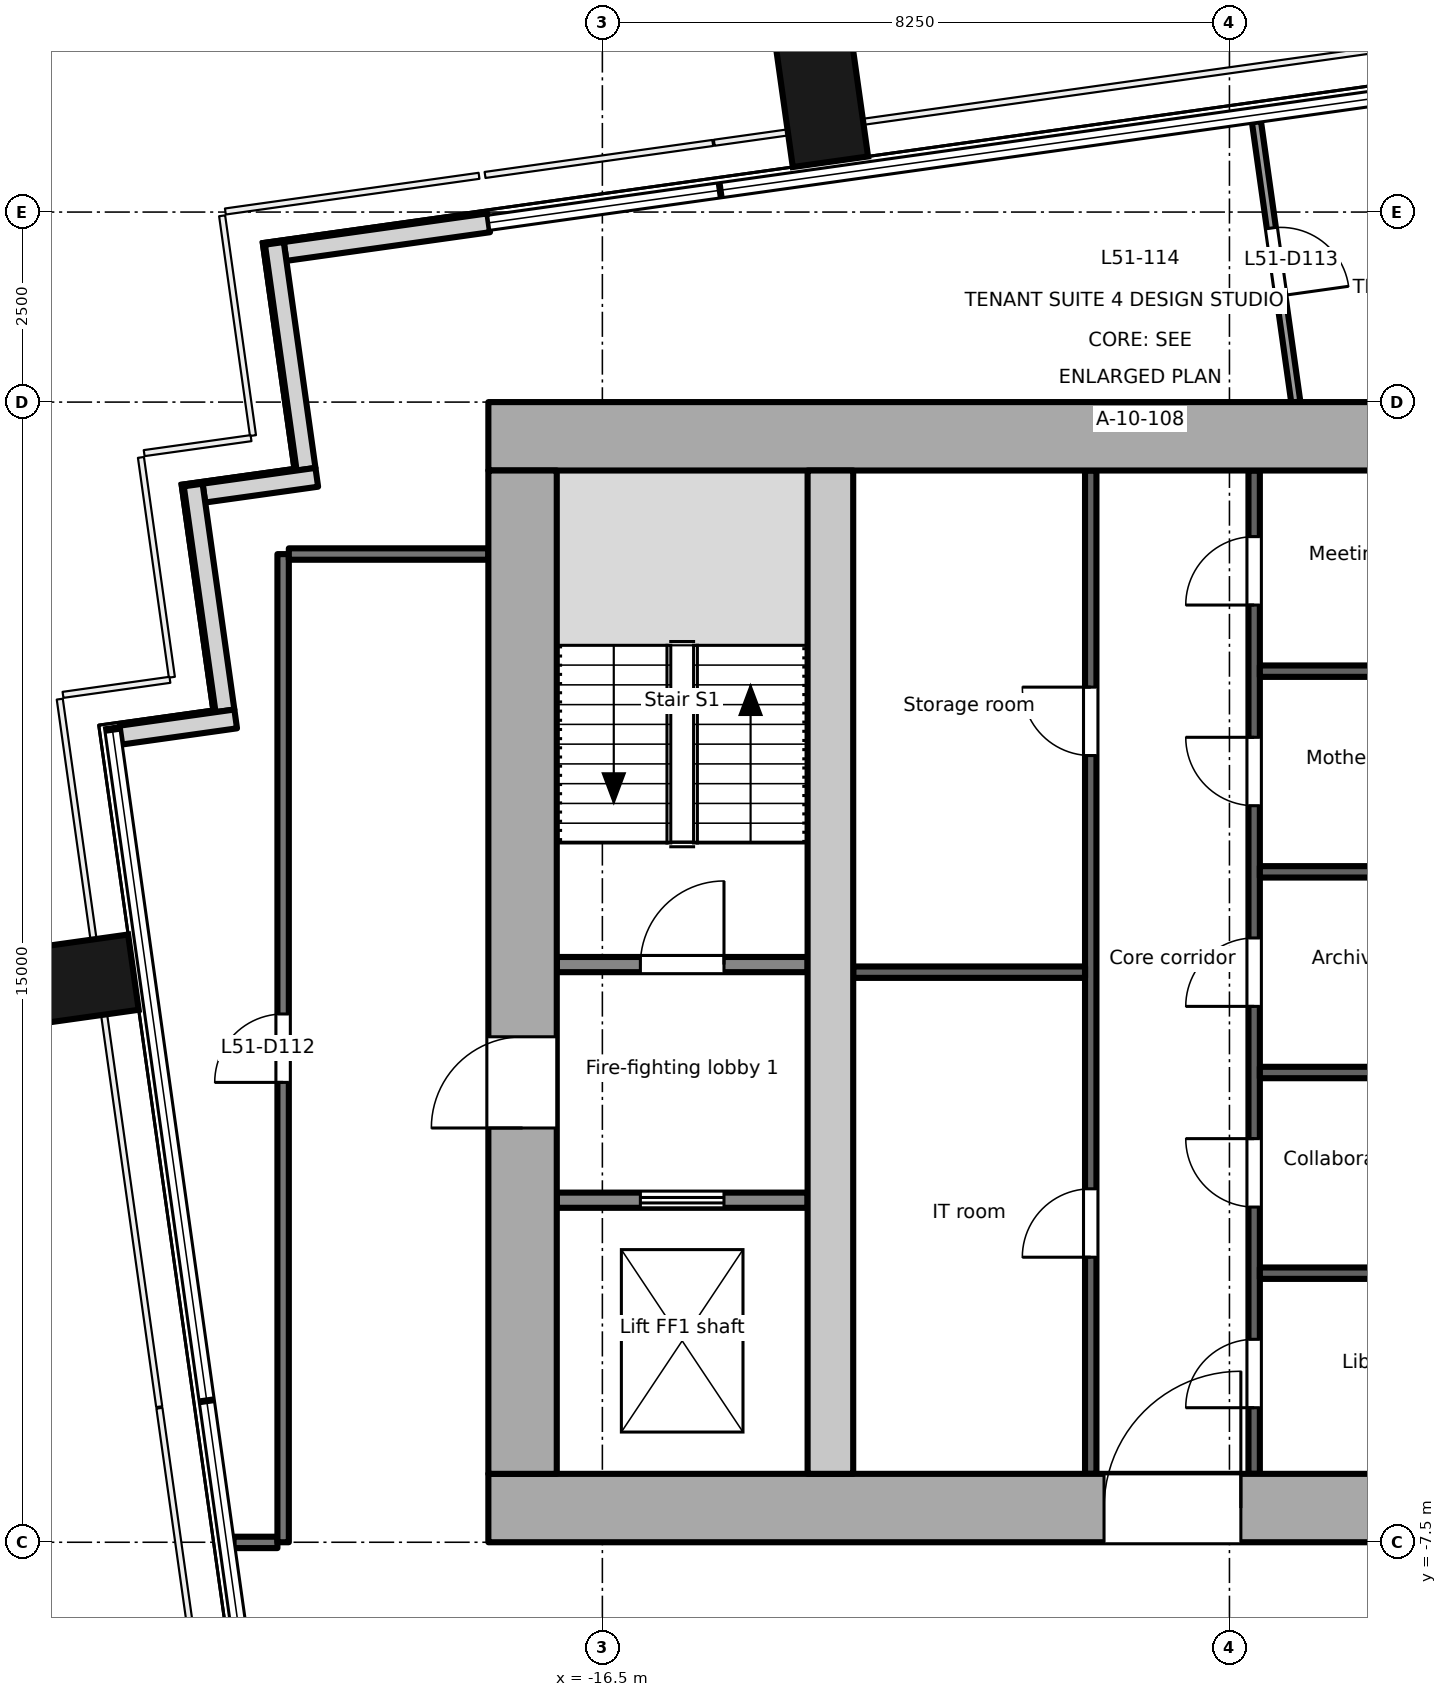
"""IFC4 building model, lengths in metres.
Left out: names, types, materials, properties, quantities, classifications, styles, units other than length and angle.
Written with IfcOpenShell. Run it as: python <this file> out.ifc"""

import sys

from ifc_helpers import new_model, si_unit, direction, frame, frame_2d, origin, origin_2d, place, context, subcontext, project, spatial, rectangle, extrude, element, fill, save


model = new_model("IFC4")
c1 = context("Model", 3, precision=1e-05, world=origin(), true_north=direction((0.0, 1.0)))
c2 = subcontext(c1, "Body", "Model", "MODEL_VIEW")
j1 = project(units=[si_unit("LENGTHUNIT", "METRE"), si_unit("PLANEANGLEUNIT", "RADIAN")], contexts=[c1])
p1 = place(None, origin())
s1 = spatial("IfcSite", under=j1, at=p1, CompositionType="ELEMENT")
p2 = place(p1, origin())
s2 = spatial("IfcBuilding", under=s1, at=p2, CompositionType="ELEMENT")
p3 = place(p2, frame((0.0, 0.0, 225.2)))
s3 = spatial("IfcBuildingStorey", under=s2, at=p3, CompositionType="ELEMENT", Elevation=225.2)
for number, where, z_axis, x_axis in (
    (1, (-23.561, -0.125, -0.2), (0.0, 0.0, 1.0), (-0.139, 0.99, 0.0)),
    (2, (-13.625, 11.553, -0.2), (0.0, 0.0, 1.0), (0.99, 0.139, 0.0)),
):
    element("IfcColumn", number, at=place(p3, frame(where, z_axis=z_axis, x_axis=x_axis)), inside=s3, PredefinedType="COLUMN", context=c2, shape_type="SweptSolid", body=[
        extrude(rectangle(XDim=1.0, YDim=1.8, at=origin_2d()), origin(), (0.0, 0.0, 1.0), 3.9),
    ])
p4 = place(p3, frame((-17.995, 9.859, 0.0), z_axis=(0.0, 0.0, 1.0), x_axis=(-0.99024510326, -0.139336411139, 0.0)))
e3 = element("IfcWall", 3, at=p4, inside=s3, PredefinedType="SOLIDWALL", context=c2, shape_type="SweptSolid", body=[
    extrude(rectangle(XDim=2.705, YDim=0.25, at=frame_2d((1.353, 0.0))), origin(), (0.0, 0.0, 1.0), 3.7),
])
p5 = place(p3, frame((-20.815, 9.588, 0.0), z_axis=(0.0, 0.0, 1.0), x_axis=(0.138983028379, -0.9902947631, 0.0)))
e4 = element("IfcWall", 4, at=p5, inside=s3, PredefinedType="SOLIDWALL", context=c2, shape_type="SweptSolid", body=[
    extrude(rectangle(XDim=3.0, YDim=0.25, at=frame_2d((1.5, 0.0))), origin(), (0.0, 0.0, 1.0), 3.7),
])
p6 = place(p3, frame((-20.257, 6.51, 0.0), z_axis=(0.0, 0.0, 1.0), x_axis=(-0.990330117064, -0.138730887823, 0.0)))
e5 = element("IfcWall", 5, at=p6, inside=s3, PredefinedType="SOLIDWALL", context=c2, shape_type="SweptSolid", body=[
    extrude(rectangle(XDim=1.499, YDim=0.25, at=frame_2d((0.75, 0.0))), origin(), (0.0, 0.0, 1.0), 3.7),
])
p7 = place(p3, frame((-21.883, 6.409, 0.0), z_axis=(0.0, 0.0, 1.0), x_axis=(0.139324658755, -0.990246756855, 0.0)))
e6 = element("IfcWall", 6, at=p7, inside=s3, PredefinedType="SOLIDWALL", context=c2, shape_type="SweptSolid", body=[
    extrude(rectangle(XDim=3.0, YDim=0.25, at=frame_2d((1.5, 0.0))), origin(), (0.0, 0.0, 1.0), 3.7),
])
p8 = place(p3, frame((-21.324, 3.332, 0.0), z_axis=(0.0, 0.0, 1.0), x_axis=(-0.990238641016, -0.139382329723, 0.0)))
e7 = element("IfcWall", 7, at=p8, inside=s3, PredefinedType="SOLIDWALL", context=c2, shape_type="SweptSolid", body=[
    extrude(rectangle(XDim=1.526, YDim=0.25, at=frame_2d((0.763, 0.0))), origin(), (0.0, 0.0, 1.0), 3.7),
])
p9 = place(p3, frame((-18.0, -7.05, -0.2), z_axis=(0.0, 0.0, 1.0), x_axis=(1.0, 0.0, 0.0)))
e8 = element("IfcWall", 8, at=p9, inside=s3, PredefinedType="SHEAR", context=c2, shape_type="SweptSolid", body=[
    extrude(rectangle(XDim=36.0, YDim=0.9, at=frame_2d((18.0, 0.0))), origin(), (0.0, 0.0, 1.0), 3.9),
])
p10 = place(p9, frame((8.1, 0.0, 0.2)))
e9 = element("IfcOpeningElement", 9, at=p10, cuts=e8, PredefinedType="OPENING", context=c2, shape_type="SweptSolid", body=[
    extrude(rectangle(XDim=1.8, YDim=2.1, at=frame_2d((0.9, 1.05))), frame((0.0, 0.46, 0.0), z_axis=(0.0, -1.0, 0.0), x_axis=(1.0, 0.0, 0.0)), (0.0, 0.0, 1.0), 0.921),
])
p11 = place(p9, frame((16.8, 0.0, 0.2)))
e10 = element("IfcOpeningElement", 10, at=p11, cuts=e8, PredefinedType="OPENING", context=c2, shape_type="SweptSolid", body=[
    extrude(rectangle(XDim=2.4, YDim=2.1, at=frame_2d((1.2, 1.05))), frame((0.0, 0.46, 0.0), z_axis=(0.0, -1.0, 0.0), x_axis=(1.0, 0.0, 0.0)), (0.0, 0.0, 1.0), 0.921),
])
p12 = place(p9, frame((26.1, 0.0, 0.2)))
e11 = element("IfcOpeningElement", 11, at=p12, cuts=e8, PredefinedType="OPENING", context=c2, shape_type="SweptSolid", body=[
    extrude(rectangle(XDim=2.4, YDim=2.1, at=frame_2d((1.2, 1.05))), frame((0.0, 0.46, 0.0), z_axis=(0.0, -1.0, 0.0), x_axis=(1.0, 0.0, 0.0)), (0.0, 0.0, 1.0), 0.921),
])
p13 = place(p3, frame((-18.0, 7.05, -0.2), z_axis=(0.0, 0.0, 1.0), x_axis=(1.0, 0.0, 0.0)))
e12 = element("IfcWall", 12, at=p13, inside=s3, PredefinedType="SHEAR", context=c2, shape_type="SweptSolid", body=[
    extrude(rectangle(XDim=36.0, YDim=0.9, at=frame_2d((18.0, 0.0))), origin(), (0.0, 0.0, 1.0), 3.9),
])
p14 = place(p3, frame((-17.55, -6.6, -0.2), z_axis=(0.0, 0.0, 1.0), x_axis=(0.0, 1.0, 0.0)))
e13 = element("IfcWall", 13, at=p14, inside=s3, PredefinedType="SHEAR", context=c2, shape_type="SweptSolid", body=[
    extrude(rectangle(XDim=13.2, YDim=0.9, at=frame_2d((6.6, 0.0))), origin(), (0.0, 0.0, 1.0), 3.9),
])
p15 = place(p14, frame((4.55, 0.0, 0.2)))
e14 = element("IfcOpeningElement", 14, at=p15, cuts=e13, PredefinedType="OPENING", context=c2, shape_type="SweptSolid", body=[
    extrude(rectangle(XDim=1.2, YDim=2.1, at=frame_2d((0.6, 1.05))), frame((0.0, 0.46, 0.0), z_axis=(0.0, -1.0, 0.0), x_axis=(1.0, 0.0, 0.0)), (0.0, 0.0, 1.0), 0.921),
])
p16 = place(p3, frame((-13.5, -6.6, -0.2), z_axis=(0.0, 0.0, 1.0), x_axis=(0.0, 1.0, 0.0)))
e15 = element("IfcWall", 15, at=p16, inside=s3, PredefinedType="SHEAR", context=c2, shape_type="SweptSolid", body=[
    extrude(rectangle(XDim=13.2, YDim=0.6, at=frame_2d((6.6, 0.0))), origin(), (0.0, 0.0, 1.0), 3.9),
])
p17 = place(p3, frame((-17.1, -3.0, 0.0), z_axis=(0.0, 0.0, 1.0), x_axis=(1.0, 0.0, 0.0)))
e16 = element("IfcWall", 16, at=p17, inside=s3, PredefinedType="PARTITIONING", context=c2, shape_type="SweptSolid", body=[
    extrude(rectangle(XDim=3.3, YDim=0.2, at=frame_2d((1.65, 0.0))), origin(), (0.0, 0.0, 1.0), 3.7),
])
p18 = place(p17, frame((1.1, 0.0, 0.0)))
e17 = element("IfcOpeningElement", 17, at=p18, cuts=e16, PredefinedType="OPENING", context=c2, shape_type="SweptSolid", body=[
    extrude(rectangle(XDim=1.1, YDim=2.1, at=frame_2d((0.55, 1.05))), frame((0.0, 0.111, 0.0), z_axis=(0.0, -1.0, 0.0), x_axis=(1.0, 0.0, 0.0)), (0.0, 0.0, 1.0), 0.221),
])
p19 = place(p3, frame((-17.1, 0.1, 0.0), z_axis=(0.0, 0.0, 1.0), x_axis=(1.0, 0.0, 0.0)))
e18 = element("IfcWall", 18, at=p19, inside=s3, PredefinedType="PARTITIONING", context=c2, shape_type="SweptSolid", body=[
    extrude(rectangle(XDim=3.3, YDim=0.2, at=frame_2d((1.65, 0.0))), origin(), (0.0, 0.0, 1.0), 3.7),
])
p20 = place(p19, frame((1.1, 0.0, 0.0)))
e19 = element("IfcOpeningElement", 19, at=p20, cuts=e18, PredefinedType="OPENING", context=c2, shape_type="SweptSolid", body=[
    extrude(rectangle(XDim=1.1, YDim=2.1, at=frame_2d((0.55, 1.05))), frame((0.0, 0.111, 0.0), z_axis=(0.0, -1.0, 0.0), x_axis=(1.0, 0.0, 0.0)), (0.0, 0.0, 1.0), 0.221),
])
p21 = place(p3, frame((-10.075, -6.6, 0.0), z_axis=(0.0, 0.0, 1.0), x_axis=(0.0, 1.0, 0.0)))
e20 = element("IfcWall", 20, at=p21, inside=s3, PredefinedType="PARTITIONING", context=c2, shape_type="SweptSolid", body=[
    extrude(rectangle(XDim=13.2, YDim=0.15, at=frame_2d((6.6, 0.0))), origin(), (0.0, 0.0, 1.0), 3.7),
])
p22 = place(p21, frame((2.85, 0.0, 0.0)))
e21 = element("IfcOpeningElement", 21, at=p22, cuts=e20, PredefinedType="OPENING", context=c2, shape_type="SweptSolid", body=[
    extrude(rectangle(XDim=0.9, YDim=2.1, at=frame_2d((0.45, 1.05))), frame((0.0, 0.085, 0.0), z_axis=(0.0, -1.0, 0.0), x_axis=(1.0, 0.0, 0.0)), (0.0, 0.0, 1.0), 0.171),
])
p23 = place(p21, frame((9.45, 0.0, 0.0)))
e22 = element("IfcOpeningElement", 22, at=p23, cuts=e20, PredefinedType="OPENING", context=c2, shape_type="SweptSolid", body=[
    extrude(rectangle(XDim=0.9, YDim=2.1, at=frame_2d((0.45, 1.05))), frame((0.0, 0.085, 0.0), z_axis=(0.0, -1.0, 0.0), x_axis=(1.0, 0.0, 0.0)), (0.0, 0.0, 1.0), 0.171),
])
p24 = place(p3, frame((-13.2, 0.0, 0.0), z_axis=(0.0, 0.0, 1.0), x_axis=(1.0, 0.0, 0.0)))
e23 = element("IfcWall", 23, at=p24, inside=s3, PredefinedType="PARTITIONING", context=c2, shape_type="SweptSolid", body=[
    extrude(rectangle(XDim=3.05, YDim=0.15, at=frame_2d((1.525, 0.0))), origin(), (0.0, 0.0, 1.0), 3.7),
])
p25 = place(p3, frame((-7.925, -6.6, 0.0), z_axis=(0.0, 0.0, 1.0), x_axis=(0.0, 1.0, 0.0)))
e24 = element("IfcWall", 24, at=p25, inside=s3, PredefinedType="PARTITIONING", context=c2, shape_type="SweptSolid", body=[
    extrude(rectangle(XDim=13.2, YDim=0.15, at=frame_2d((6.6, 0.0))), origin(), (0.0, 0.0, 1.0), 3.7),
])
p26 = place(p25, frame((0.87, 0.0, 0.0)))
e25 = element("IfcOpeningElement", 25, at=p26, cuts=e24, PredefinedType="OPENING", context=c2, shape_type="SweptSolid", body=[
    extrude(rectangle(XDim=0.9, YDim=2.1, at=frame_2d((0.45, 1.05))), frame((0.0, 0.085, 0.0), z_axis=(0.0, -1.0, 0.0), x_axis=(1.0, 0.0, 0.0)), (0.0, 0.0, 1.0), 0.171),
])
p27 = place(p25, frame((3.51, 0.0, 0.0)))
e26 = element("IfcOpeningElement", 26, at=p27, cuts=e24, PredefinedType="OPENING", context=c2, shape_type="SweptSolid", body=[
    extrude(rectangle(XDim=0.9, YDim=2.1, at=frame_2d((0.45, 1.05))), frame((0.0, 0.085, 0.0), z_axis=(0.0, -1.0, 0.0), x_axis=(1.0, 0.0, 0.0)), (0.0, 0.0, 1.0), 0.171),
])
p28 = place(p25, frame((6.15, 0.0, 0.0)))
e27 = element("IfcOpeningElement", 27, at=p28, cuts=e24, PredefinedType="OPENING", context=c2, shape_type="SweptSolid", body=[
    extrude(rectangle(XDim=0.9, YDim=2.1, at=frame_2d((0.45, 1.05))), frame((0.0, 0.085, 0.0), z_axis=(0.0, -1.0, 0.0), x_axis=(1.0, 0.0, 0.0)), (0.0, 0.0, 1.0), 0.171),
])
p29 = place(p25, frame((8.79, 0.0, 0.0)))
e28 = element("IfcOpeningElement", 28, at=p29, cuts=e24, PredefinedType="OPENING", context=c2, shape_type="SweptSolid", body=[
    extrude(rectangle(XDim=0.9, YDim=2.1, at=frame_2d((0.45, 1.05))), frame((0.0, 0.085, 0.0), z_axis=(0.0, -1.0, 0.0), x_axis=(1.0, 0.0, 0.0)), (0.0, 0.0, 1.0), 0.171),
])
p30 = place(p25, frame((11.43, 0.0, 0.0)))
e29 = element("IfcOpeningElement", 29, at=p30, cuts=e24, PredefinedType="OPENING", context=c2, shape_type="SweptSolid", body=[
    extrude(rectangle(XDim=0.9, YDim=2.1, at=frame_2d((0.45, 1.05))), frame((0.0, 0.085, 0.0), z_axis=(0.0, -1.0, 0.0), x_axis=(1.0, 0.0, 0.0)), (0.0, 0.0, 1.0), 0.171),
])
for number, where, z_axis, x_axis in (
    (30, (-7.85, -3.96, 0.0), (0.0, 0.0, 1.0), (1.0, 0.0, 0.0)),
    (31, (-7.85, -1.32, 0.0), (0.0, 0.0, 1.0), (1.0, 0.0, 0.0)),
    (32, (-7.85, 1.32, 0.0), (0.0, 0.0, 1.0), (1.0, 0.0, 0.0)),
    (33, (-7.85, 3.96, 0.0), (0.0, 0.0, 1.0), (1.0, 0.0, 0.0)),
):
    element("IfcWall", number, at=place(p3, frame(where, z_axis=z_axis, x_axis=x_axis)), inside=s3, PredefinedType="PARTITIONING", context=c2, shape_type="SweptSolid", body=[
        extrude(rectangle(XDim=3.05, YDim=0.15, at=frame_2d((1.525, 0.0))), origin(), (0.0, 0.0, 1.0), 3.7),
    ])
p31 = place(p3, frame((-21.352, -7.502, 0.0), z_axis=(0.0, 0.0, 1.0), x_axis=(1.0, 0.0, 0.0)))
e34 = element("IfcWall", 34, at=p31, inside=s3, PredefinedType="PARTITIONING", context=c2, shape_type="SweptSolid", body=[
    extrude(rectangle(XDim=0.577, YDim=0.15, at=frame_2d((0.289, 0.0))), origin(), (0.0, 0.0, 1.0), 3.7),
])
p32 = place(p3, frame((-20.7, -7.5, 0.0), z_axis=(0.0, 0.0, 1.0), x_axis=(0.0, 1.0, 0.0)))
e35 = element("IfcWall", 35, at=p32, inside=s3, PredefinedType="PARTITIONING", context=c2, shape_type="SweptSolid", body=[
    extrude(rectangle(XDim=13.0, YDim=0.15, at=frame_2d((6.5, 0.0))), origin(), (0.0, 0.0, 1.0), 3.4),
])
p33 = place(p32, frame((6.05, 0.0, 0.0)))
e36 = element("IfcOpeningElement", 36, at=p33, cuts=e35, PredefinedType="OPENING", context=c2, shape_type="SweptSolid", body=[
    extrude(rectangle(XDim=0.9, YDim=2.1, at=frame_2d((0.45, 1.05))), frame((0.0, 0.085, 0.0), z_axis=(0.0, -1.0, 0.0), x_axis=(1.0, 0.0, 0.0)), (0.0, 0.0, 1.0), 0.171),
])
p34 = place(p3, frame((-20.625, 5.501, 0.0), z_axis=(0.0, 0.0, 1.0), x_axis=(1.0, 0.0, 0.0)))
e37 = element("IfcWall", 37, at=p34, inside=s3, PredefinedType="PARTITIONING", context=c2, shape_type="SweptSolid", body=[
    extrude(rectangle(XDim=2.625, YDim=0.15, at=frame_2d((1.312, 0.0))), origin(), (0.0, 0.0, 1.0), 3.7),
])
p35 = place(p3, frame((-7.895, 11.188, 0.0), z_axis=(0.0, 0.0, 1.0), x_axis=(0.139108182039, -0.990277190331, 0.0)))
e38 = element("IfcWall", 38, at=p35, inside=s3, PredefinedType="PARTITIONING", context=c2, shape_type="SweptSolid", body=[
    extrude(rectangle(XDim=3.724, YDim=0.12, at=frame_2d((1.862, 0.0))), origin(), (0.0, 0.0, 1.0), 3.7),
])
p36 = place(p35, frame((1.412, 0.0, 0.0)))
e39 = element("IfcOpeningElement", 39, at=p36, cuts=e38, PredefinedType="OPENING", context=c2, shape_type="SweptSolid", body=[
    extrude(rectangle(XDim=0.9, YDim=2.1, at=frame_2d((0.45, 1.05))), frame((0.0, 0.071, 0.0), z_axis=(0.0, -1.0, 0.0), x_axis=(1.0, 0.0, 0.0)), (0.0, 0.0, 1.0), 0.141),
])
p37 = place(p18, origin())
e40 = element("IfcDoor", 40, at=p37, inside=s3, OperationType="DOUBLE_DOOR_SLIDING", PredefinedType="DOOR", context=c2, shape_type="SweptSolid", body=[
    extrude(rectangle(XDim=1.1, YDim=2.1, at=frame_2d((0.55, 1.05))), frame((0.0, 0.025, 0.0), z_axis=(0.0, -1.0, 0.0), x_axis=(1.0, 0.0, 0.0)), (0.0, 0.0, 1.0), 0.05),
])
fill(e17, e40)
p38 = place(p15, origin())
e41 = element("IfcDoor", 41, at=p38, inside=s3, OperationType="SINGLE_SWING_LEFT", PredefinedType="DOOR", context=c2, shape_type="SweptSolid", body=[
    extrude(rectangle(XDim=1.2, YDim=2.1, at=frame_2d((0.6, 1.05))), frame((0.0, 0.025, 0.0), z_axis=(0.0, -1.0, 0.0), x_axis=(1.0, 0.0, 0.0)), (0.0, 0.0, 1.0), 0.05),
])
fill(e14, e41)
p39 = place(p20, origin())
e42 = element("IfcDoor", 42, at=p39, inside=s3, OperationType="SINGLE_SWING_RIGHT", PredefinedType="DOOR", context=c2, shape_type="SweptSolid", body=[
    extrude(rectangle(XDim=1.1, YDim=2.1, at=frame_2d((0.55, 1.05))), frame((0.0, 0.025, 0.0), z_axis=(0.0, -1.0, 0.0), x_axis=(1.0, 0.0, 0.0)), (0.0, 0.0, 1.0), 0.05),
])
fill(e19, e42)
p40 = place(p22, origin())
e43 = element("IfcDoor", 43, at=p40, inside=s3, OperationType="SINGLE_SWING_LEFT", PredefinedType="DOOR", context=c2, shape_type="SweptSolid", body=[
    extrude(rectangle(XDim=0.9, YDim=2.1, at=frame_2d((0.45, 1.05))), frame((0.0, 0.025, 0.0), z_axis=(0.0, -1.0, 0.0), x_axis=(1.0, 0.0, 0.0)), (0.0, 0.0, 1.0), 0.05),
])
fill(e21, e43)
p41 = place(p23, origin())
e44 = element("IfcDoor", 44, at=p41, inside=s3, OperationType="SINGLE_SWING_RIGHT", PredefinedType="DOOR", context=c2, shape_type="SweptSolid", body=[
    extrude(rectangle(XDim=0.9, YDim=2.1, at=frame_2d((0.45, 1.05))), frame((0.0, 0.025, 0.0), z_axis=(0.0, -1.0, 0.0), x_axis=(1.0, 0.0, 0.0)), (0.0, 0.0, 1.0), 0.05),
])
fill(e22, e44)
p42 = place(p26, origin())
e45 = element("IfcDoor", 45, at=p42, inside=s3, OperationType="SINGLE_SWING_LEFT", PredefinedType="DOOR", context=c2, shape_type="SweptSolid", body=[
    extrude(rectangle(XDim=0.9, YDim=2.1, at=frame_2d((0.45, 1.05))), frame((0.0, 0.025, 0.0), z_axis=(0.0, -1.0, 0.0), x_axis=(1.0, 0.0, 0.0)), (0.0, 0.0, 1.0), 0.05),
])
fill(e25, e45)
p43 = place(p27, origin())
e46 = element("IfcDoor", 46, at=p43, inside=s3, OperationType="SINGLE_SWING_RIGHT", PredefinedType="DOOR", context=c2, shape_type="SweptSolid", body=[
    extrude(rectangle(XDim=0.9, YDim=2.1, at=frame_2d((0.45, 1.05))), frame((0.0, 0.025, 0.0), z_axis=(0.0, -1.0, 0.0), x_axis=(1.0, 0.0, 0.0)), (0.0, 0.0, 1.0), 0.05),
])
fill(e26, e46)
p44 = place(p28, origin())
e47 = element("IfcDoor", 47, at=p44, inside=s3, OperationType="SINGLE_SWING_LEFT", PredefinedType="DOOR", context=c2, shape_type="SweptSolid", body=[
    extrude(rectangle(XDim=0.9, YDim=2.1, at=frame_2d((0.45, 1.05))), frame((0.0, 0.025, 0.0), z_axis=(0.0, -1.0, 0.0), x_axis=(1.0, 0.0, 0.0)), (0.0, 0.0, 1.0), 0.05),
])
fill(e27, e47)
p45 = place(p29, origin())
e48 = element("IfcDoor", 48, at=p45, inside=s3, OperationType="SINGLE_SWING_RIGHT", PredefinedType="DOOR", context=c2, shape_type="SweptSolid", body=[
    extrude(rectangle(XDim=0.9, YDim=2.1, at=frame_2d((0.45, 1.05))), frame((0.0, 0.025, 0.0), z_axis=(0.0, -1.0, 0.0), x_axis=(1.0, 0.0, 0.0)), (0.0, 0.0, 1.0), 0.05),
])
fill(e28, e48)
p46 = place(p30, origin())
e49 = element("IfcDoor", 49, at=p46, inside=s3, OperationType="SINGLE_SWING_LEFT", PredefinedType="DOOR", context=c2, shape_type="SweptSolid", body=[
    extrude(rectangle(XDim=0.9, YDim=2.1, at=frame_2d((0.45, 1.05))), frame((0.0, 0.025, 0.0), z_axis=(0.0, -1.0, 0.0), x_axis=(1.0, 0.0, 0.0)), (0.0, 0.0, 1.0), 0.05),
])
fill(e29, e49)
p47 = place(p10, origin())
e50 = element("IfcDoor", 50, at=p47, inside=s3, OperationType="SINGLE_SWING_RIGHT", PredefinedType="DOOR", context=c2, shape_type="SweptSolid", body=[
    extrude(rectangle(XDim=1.8, YDim=2.1, at=frame_2d((0.9, 1.05))), frame((0.0, 0.025, 0.0), z_axis=(0.0, -1.0, 0.0), x_axis=(1.0, 0.0, 0.0)), (0.0, 0.0, 1.0), 0.05),
])
fill(e9, e50)
p48 = place(p33, origin())
e51 = element("IfcDoor", 51, at=p48, inside=s3, OperationType="SINGLE_SWING_LEFT", PredefinedType="DOOR", context=c2, shape_type="SweptSolid", body=[
    extrude(rectangle(XDim=0.9, YDim=2.1, at=frame_2d((0.45, 1.05))), frame((0.0, 0.025, 0.0), z_axis=(0.0, -1.0, 0.0), x_axis=(1.0, 0.0, 0.0)), (0.0, 0.0, 1.0), 0.05),
])
fill(e36, e51)
p49 = place(p36, origin())
e52 = element("IfcDoor", 52, at=p49, inside=s3, OperationType="SINGLE_SWING_RIGHT", PredefinedType="DOOR", context=c2, shape_type="SweptSolid", body=[
    extrude(rectangle(XDim=0.9, YDim=2.1, at=frame_2d((0.45, 1.05))), frame((0.0, 0.025, 0.0), z_axis=(0.0, -1.0, 0.0), x_axis=(1.0, 0.0, 0.0)), (0.0, 0.0, 1.0), 0.05),
])
fill(e39, e52)
save(model, sys.argv[1])
